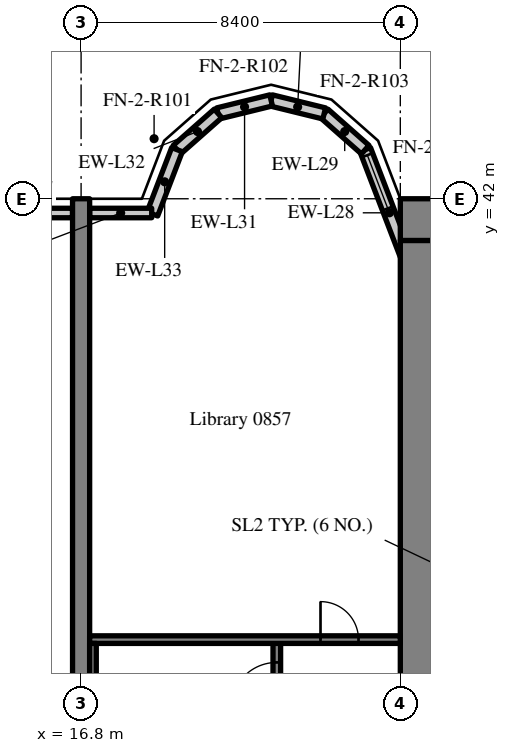
"""IFC4 building model, lengths in metres.
Left out: names, types, materials, properties, quantities, classifications, styles, units other than length and angle.
Written with IfcOpenShell. Run it as: python <this file> out.ifc"""

import sys

from ifc_helpers import new_model, si_unit, direction, frame, frame_2d, origin, place, context, subcontext, project, spatial, rectangle, extrude, source, transform, mapped, element, fill, save


model = new_model("IFC4")
c1 = context("Model", 3, precision=1e-05, world=origin(), true_north=direction((0.0, 1.0)))
c2 = subcontext(c1, "Body", "Model", "MODEL_VIEW")
j1 = project(units=[si_unit("LENGTHUNIT", "METRE"), si_unit("PLANEANGLEUNIT", "RADIAN")], contexts=[c1])
p1 = place(None, origin())
s1 = spatial("IfcSite", under=j1, at=p1, CompositionType="ELEMENT")
p2 = place(p1, origin())
s2 = spatial("IfcBuilding", under=s1, at=p2, CompositionType="ELEMENT")
p3 = place(p2, frame((0.0, 0.0, 39.2)))
s3 = spatial("IfcBuildingStorey", under=s2, at=p3, CompositionType="ELEMENT", Elevation=39.2)
m1 = source(origin(), c2, "Body", "SweptSolid", [
    extrude(rectangle(XDim=50.4, YDim=1.1, at=frame_2d((25.2, 0.0))), origin(), (0.0, 0.0, 1.0), 3.52),
])
p4 = place(p3, frame((25.2, 41.45, 0.0), z_axis=(0.0, 0.0, 1.0), x_axis=(1.0, 0.0, 0.0)))
e1 = element("IfcWall", 1, at=p4, inside=s3, PredefinedType="SHEAR", context=c2, shape_type="MappedRepresentation", body=[
    mapped(m1, transform((0.0, 0.0, 0.0), scale=1.0)),
])
m2 = source(origin(), c2, "Body", "SweptSolid", [
    extrude(rectangle(XDim=17.8, YDim=1.1, at=frame_2d((8.9, 0.0))), origin(), (0.0, 0.0, 1.0), 3.52),
])
p5 = place(p3, frame((25.75, 23.1, 0.0), z_axis=(0.0, 0.0, 1.0), x_axis=(0.0, 1.0, 0.0)))
e2 = element("IfcWall", 2, at=p5, inside=s3, PredefinedType="SHEAR", context=c2, shape_type="MappedRepresentation", body=[
    mapped(m2, transform((0.0, 0.0, 0.0), scale=1.0)),
])
m3 = source(origin(), c2, "Body", "SweptSolid", [
    extrude(rectangle(XDim=20.0, YDim=0.45, at=frame_2d((10.0, 0.0))), origin(), (0.0, 0.0, 1.0), 3.52),
])
p6 = place(p3, frame((16.8, 22.0, 0.0), z_axis=(0.0, 0.0, 1.0), x_axis=(0.0, 1.0, 0.0)))
e3 = element("IfcWall", 3, at=p6, inside=s3, PredefinedType="SHEAR", context=c2, shape_type="MappedRepresentation", body=[
    mapped(m3, transform((0.0, 0.0, 0.0), scale=1.0)),
])
m4 = source(origin(), c2, "Body", "SweptSolid", [
    extrude(rectangle(XDim=3.559, YDim=0.3, at=frame_2d((1.78, 0.0))), origin(), (0.0, 0.0, 1.0), 3.52),
])
p7 = place(p3, frame((25.55, 39.969, 0.0), z_axis=(0.0, 0.0, 1.0), x_axis=(-0.35779745313, 0.933799219604, 0.0)))
e4 = element("IfcWall", 4, at=p7, inside=s3, PredefinedType="SOLIDWALL", context=c2, shape_type="MappedRepresentation", body=[
    mapped(m4, transform((0.0, 0.0, 0.0), scale=1.0)),
])
m5 = source(origin(), c2, "Body", "SweptSolid", [
    extrude(rectangle(XDim=1.5, YDim=2.0, at=frame_2d((0.75, 1.0))), frame((0.0, 0.16, 0.0), z_axis=(0.0, -1.0, 0.0), x_axis=(1.0, 0.0, 0.0)), (0.0, 0.0, 1.0), 0.32),
])
p8 = place(p7, frame((1.903, 0.0, 0.9)))
e5 = element("IfcOpeningElement", 5, at=p8, cuts=e4, PredefinedType="OPENING", context=c2, shape_type="MappedRepresentation", body=[
    mapped(m5, transform((0.0, 0.0, 0.0), scale=1.0)),
])
m6 = source(origin(), c2, "Body", "SweptSolid", [
    extrude(rectangle(XDim=1.44, YDim=0.3, at=frame_2d((0.72, 0.0))), origin(), (0.0, 0.0, 1.0), 3.52),
])
p9 = place(p3, frame((24.277, 43.292, 0.0), z_axis=(0.0, 0.0, 1.0), x_axis=(-0.749649827867, 0.661834673902, 0.0)))
e6 = element("IfcWall", 6, at=p9, inside=s3, PredefinedType="SOLIDWALL", context=c2, shape_type="MappedRepresentation", body=[
    mapped(m6, transform((0.0, 0.0, 0.0), scale=1.0)),
])
m7 = source(origin(), c2, "Body", "SweptSolid", [
    extrude(rectangle(XDim=1.438, YDim=0.3, at=frame_2d((0.719, 0.0))), origin(), (0.0, 0.0, 1.0), 3.52),
])
p10 = place(p3, frame((23.197, 44.245, 0.0), z_axis=(0.0, 0.0, 1.0), x_axis=(-0.971152283879, 0.238460146601, 0.0)))
e7 = element("IfcWall", 7, at=p10, inside=s3, PredefinedType="SOLIDWALL", context=c2, shape_type="MappedRepresentation", body=[
    mapped(m7, transform((0.0, 0.0, 0.0), scale=1.0)),
])
m8 = source(origin(), c2, "Body", "SweptSolid", [
    extrude(rectangle(XDim=1.439, YDim=0.3, at=frame_2d((0.719, 0.0))), origin(), (0.0, 0.0, 1.0), 3.52),
])
p11 = place(p3, frame((21.8, 44.588, 0.0), z_axis=(0.0, 0.0, 1.0), x_axis=(-0.971161932466, -0.238420848351, 0.0)))
e8 = element("IfcWall", 8, at=p11, inside=s3, PredefinedType="SOLIDWALL", context=c2, shape_type="MappedRepresentation", body=[
    mapped(m8, transform((0.0, 0.0, 0.0), scale=1.0)),
])
m9 = source(origin(), c2, "Body", "SweptSolid", [
    extrude(rectangle(XDim=1.44, YDim=0.3, at=frame_2d((0.72, 0.0))), origin(), (0.0, 0.0, 1.0), 3.52),
])
p12 = place(p3, frame((20.403, 44.245, 0.0), z_axis=(0.0, 0.0, 1.0), x_axis=(-0.74957555648, -0.661918790432, 0.0)))
e9 = element("IfcWall", 9, at=p12, inside=s3, PredefinedType="SOLIDWALL", context=c2, shape_type="MappedRepresentation", body=[
    mapped(m9, transform((0.0, 0.0, 0.0), scale=1.0)),
])
m10 = source(origin(), c2, "Body", "SweptSolid", [
    extrude(rectangle(XDim=1.812, YDim=0.3, at=frame_2d((0.906, 0.0))), origin(), (0.0, 0.0, 1.0), 3.52),
])
p13 = place(p3, frame((19.323, 43.292, 0.0), z_axis=(0.0, 0.0, 1.0), x_axis=(-0.357877270961, -0.93376863244, 0.0)))
e10 = element("IfcWall", 10, at=p13, inside=s3, PredefinedType="SOLIDWALL", context=c2, shape_type="MappedRepresentation", body=[
    mapped(m10, transform((0.0, 0.0, 0.0), scale=1.0)),
])
m11 = source(origin(), c2, "Body", "SweptSolid", [
    extrude(rectangle(XDim=3.525, YDim=0.25, at=frame_2d((1.762, 0.0))), origin(), (0.0, 0.0, 1.0), 2.77),
])
p14 = place(p3, frame((16.575, 41.625, 0.0), z_axis=(0.0, 0.0, 1.0), x_axis=(-1.0, 0.0, 0.0)))
e11 = element("IfcWall", 11, at=p14, inside=s3, PredefinedType="SOLIDWALL", context=c2, shape_type="MappedRepresentation", body=[
    mapped(m11, transform((0.0, 0.0, 0.0), scale=1.0)),
])
m12 = source(origin(), c2, "Body", "SweptSolid", [
    extrude(rectangle(XDim=1.5, YDim=1.5, at=frame_2d((0.75, 0.75))), frame((0.0, 0.135, 0.0), z_axis=(0.0, -1.0, 0.0), x_axis=(1.0, 0.0, 0.0)), (0.0, 0.0, 1.0), 0.27),
])
p15 = place(p14, frame((1.012, 0.0, 0.9)))
e12 = element("IfcOpeningElement", 12, at=p15, cuts=e11, PredefinedType="OPENING", context=c2, shape_type="MappedRepresentation", body=[
    mapped(m12, transform((0.0, 0.0, 0.0), scale=1.0)),
])
m13 = source(origin(), c2, "Body", "SweptSolid", [
    extrude(rectangle(XDim=1.633, YDim=0.25, at=frame_2d((0.816, 0.0))), origin(), (0.0, 0.0, 1.0), 2.77),
])
p16 = place(p3, frame((18.658, 41.625, 0.0), z_axis=(0.0, 0.0, 1.0), x_axis=(-1.0, 0.0, 0.0)))
e13 = element("IfcWall", 13, at=p16, inside=s3, PredefinedType="SOLIDWALL", context=c2, shape_type="MappedRepresentation", body=[
    mapped(m13, transform((0.0, 0.0, 0.0), scale=1.0)),
])
m14 = source(origin(), c2, "Body", "SweptSolid", [
    extrude(rectangle(XDim=8.3, YDim=0.2, at=frame_2d((4.15, 0.0))), origin(), (0.0, 0.0, 1.0), 3.52),
])
p17 = place(p3, frame((21.95, 22.1, 0.0), z_axis=(0.0, 0.0, 1.0), x_axis=(0.0, 1.0, 0.0)))
e14 = element("IfcWall", 14, at=p17, inside=s3, PredefinedType="SOLIDWALL", context=c2, shape_type="MappedRepresentation", body=[
    mapped(m14, transform((0.0, 0.0, 0.0), scale=1.0)),
])
m15 = source(origin(), c2, "Body", "SweptSolid", [
    extrude(rectangle(XDim=1.2, YDim=2.1, at=frame_2d((0.6, 1.05))), frame((0.0, 0.11, 0.0), z_axis=(0.0, -1.0, 0.0), x_axis=(1.0, 0.0, 0.0)), (0.0, 0.0, 1.0), 0.22),
])
p18 = place(p17, frame((6.5, 0.0, 0.0)))
e15 = element("IfcOpeningElement", 15, at=p18, cuts=e14, PredefinedType="OPENING", context=c2, shape_type="MappedRepresentation", body=[
    mapped(m15, transform((0.0, 0.0, 0.0), scale=1.0)),
])
m16 = source(origin(), c2, "Body", "SweptSolid", [
    extrude(rectangle(XDim=8.175, YDim=0.2, at=frame_2d((4.087, 0.0))), origin(), (0.0, 0.0, 1.0), 3.52),
])
p19 = place(p3, frame((17.025, 30.4, 0.0), z_axis=(0.0, 0.0, 1.0), x_axis=(1.0, 0.0, 0.0)))
e16 = element("IfcWall", 16, at=p19, inside=s3, PredefinedType="SOLIDWALL", context=c2, shape_type="MappedRepresentation", body=[
    mapped(m16, transform((0.0, 0.0, 0.0), scale=1.0)),
])
m17 = source(origin(), c2, "Body", "SweptSolid", [
    extrude(rectangle(XDim=1.0, YDim=2.1, at=frame_2d((0.5, 1.05))), frame((0.0, 0.11, 0.0), z_axis=(0.0, -1.0, 0.0), x_axis=(1.0, 0.0, 0.0)), (0.0, 0.0, 1.0), 0.22),
])
p20 = place(p19, frame((6.075, 0.0, 0.0)))
e17 = element("IfcOpeningElement", 17, at=p20, cuts=e16, PredefinedType="OPENING", context=c2, shape_type="MappedRepresentation", body=[
    mapped(m17, transform((0.0, 0.0, 0.0), scale=1.0)),
])
m18 = source(origin(), c2, "Body", "SweptSolid", [
    extrude(rectangle(XDim=8.1, YDim=0.175, at=frame_2d((4.05, 0.0))), origin(), (0.0, 0.0, 1.0), 3.52),
])
p21 = place(p3, frame((17.112, 22.2, 0.0), z_axis=(0.0, 0.0, 1.0), x_axis=(0.0, 1.0, 0.0)))
e18 = element("IfcWall", 18, at=p21, inside=s3, PredefinedType="SOLIDWALL", context=c2, shape_type="MappedRepresentation", body=[
    mapped(m18, transform((0.0, 0.0, 0.0), scale=1.0)),
])
m19 = source(origin(), c2, "Body", "SweptSolid", [
    extrude(rectangle(XDim=1.5, YDim=2.0, at=frame_2d((0.75, 1.0))), frame((0.0, 0.03, 0.0), z_axis=(0.0, -1.0, 0.0), x_axis=(1.0, 0.0, 0.0)), (0.0, 0.0, 1.0), 0.06),
])
p22 = place(p8, origin())
e19 = element("IfcWindow", 19, at=p22, inside=s3, PartitioningType="SINGLE_PANEL", PredefinedType="WINDOW", context=c2, shape_type="MappedRepresentation", body=[
    mapped(m19, transform((0.0, 0.0, 0.0), scale=1.0)),
])
fill(e5, e19)
m20 = source(origin(), c2, "Body", "SweptSolid", [
    extrude(rectangle(XDim=1.2, YDim=2.1, at=frame_2d((0.6, 1.05))), frame((0.0, 0.025, 0.0), z_axis=(0.0, -1.0, 0.0), x_axis=(1.0, 0.0, 0.0)), (0.0, 0.0, 1.0), 0.05),
])
p23 = place(p18, origin())
e20 = element("IfcDoor", 20, at=p23, inside=s3, OperationType="SINGLE_SWING_LEFT", PredefinedType="DOOR", context=c2, shape_type="MappedRepresentation", body=[
    mapped(m20, transform((0.0, 0.0, 0.0), scale=1.0)),
])
fill(e15, e20)
m21 = source(origin(), c2, "Body", "SweptSolid", [
    extrude(rectangle(XDim=1.0, YDim=2.1, at=frame_2d((0.5, 1.05))), frame((0.0, 0.025, 0.0), z_axis=(0.0, -1.0, 0.0), x_axis=(1.0, 0.0, 0.0)), (0.0, 0.0, 1.0), 0.05),
])
p24 = place(p20, origin())
e21 = element("IfcDoor", 21, at=p24, inside=s3, OperationType="SINGLE_SWING_LEFT", PredefinedType="DOOR", context=c2, shape_type="MappedRepresentation", body=[
    mapped(m21, transform((0.0, 0.0, 0.0), scale=1.0)),
])
fill(e17, e21)
save(model, sys.argv[1])
